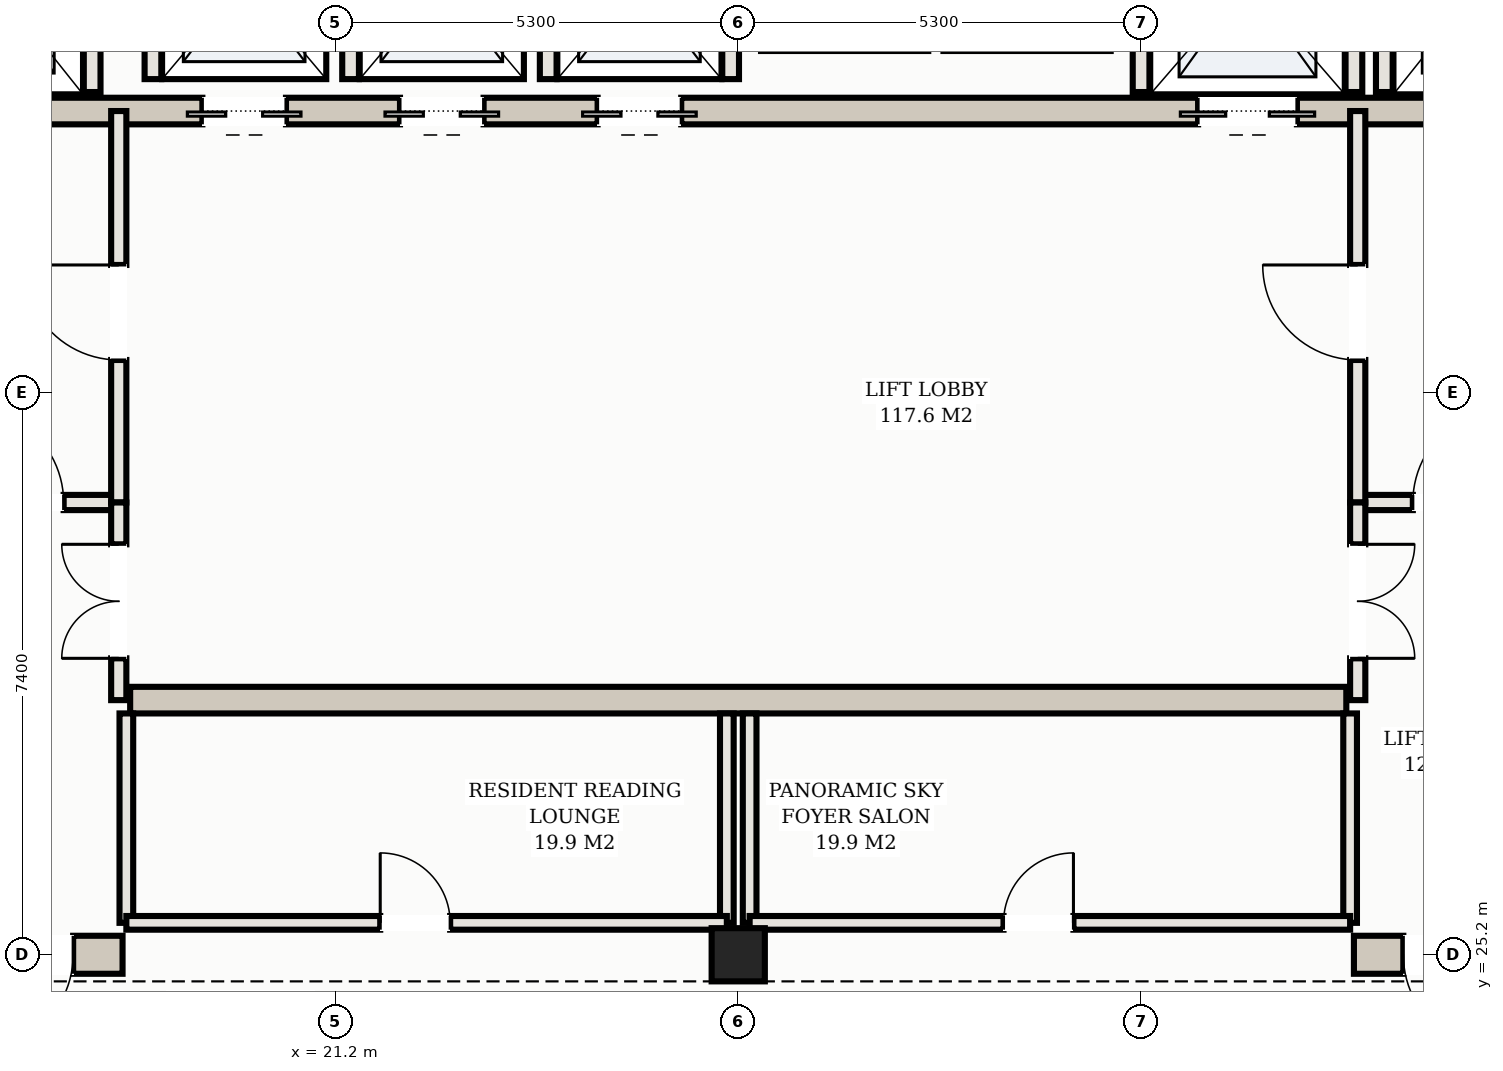
"""IFC4 building model, lengths in metres.
Left out: names, types, materials, properties, quantities, classifications, styles, units other than length and angle.
Written with IfcOpenShell. Run it as: python <this file> out.ifc"""

import sys

from ifc_helpers import new_model, si_unit, direction, frame, frame_2d, origin, origin_2d, place, context, subcontext, project, spatial, rectangle, hollow_rectangle, extrude, element, fill, save


model = new_model("IFC4")
c1 = context("Model", 3, precision=1e-05, world=origin(), true_north=direction((0.0, 1.0)))
c2 = subcontext(c1, "Body", "Model", "MODEL_VIEW")
j1 = project(units=[si_unit("LENGTHUNIT", "METRE"), si_unit("PLANEANGLEUNIT", "RADIAN")], contexts=[c1])
p1 = place(None, origin())
s1 = spatial("IfcSite", under=j1, at=p1, CompositionType="ELEMENT")
p2 = place(p1, origin())
s2 = spatial("IfcBuilding", under=s1, at=p2, CompositionType="ELEMENT")
p3 = place(p2, frame((0.0, 0.0, 256.1)))
s3 = spatial("IfcBuildingStorey", under=s2, at=p3, CompositionType="ELEMENT", Elevation=256.1)
p4 = place(p3, frame((10.35, 25.2, 0.0), z_axis=(0.0, 0.0, 1.0), x_axis=(1.0, 0.0, 0.0)))
e1 = element("IfcWall", 1, at=p4, inside=s3, PredefinedType="SHEAR", context=c2, shape_type="SweptSolid", body=[
    extrude(rectangle(XDim=8.05, YDim=0.5, at=frame_2d((4.025, 0.0))), origin(), (0.0, 0.0, 1.0), 3.11),
])
p5 = place(p4, frame((6.15, 0.0, 0.0)))
e2 = element("IfcOpeningElement", 2, at=p5, cuts=e1, PredefinedType="OPENING", context=c2, shape_type="SweptSolid", body=[
    extrude(rectangle(XDim=1.25, YDim=2.2, at=frame_2d((0.625, 1.1))), frame((0.0, 0.26, 0.0), z_axis=(0.0, -1.0, 0.0), x_axis=(1.0, 0.0, 0.0)), (0.0, 0.0, 1.0), 0.52),
])
p6 = place(p3, frame((34.6, 25.2, 0.0), z_axis=(0.0, 0.0, 1.0), x_axis=(1.0, 0.0, 0.0)))
e3 = element("IfcWall", 3, at=p6, inside=s3, PredefinedType="SHEAR", context=c2, shape_type="SweptSolid", body=[
    extrude(rectangle(XDim=8.05, YDim=0.5, at=frame_2d((4.025, 0.0))), origin(), (0.0, 0.0, 1.0), 3.11),
])
p7 = place(p6, frame((0.65, 0.0, 0.0)))
e4 = element("IfcOpeningElement", 4, at=p7, cuts=e3, PredefinedType="OPENING", context=c2, shape_type="SweptSolid", body=[
    extrude(rectangle(XDim=1.25, YDim=2.2, at=frame_2d((0.625, 1.1))), frame((0.0, 0.26, 0.0), z_axis=(0.0, -1.0, 0.0), x_axis=(1.0, 0.0, 0.0)), (0.0, 0.0, 1.0), 0.52),
])
p8 = place(p3, frame((15.5, 36.3, 0.0), z_axis=(0.0, 0.0, 1.0), x_axis=(1.0, 0.0, 0.0)))
e5 = element("IfcWall", 5, at=p8, inside=s3, PredefinedType="SHEAR", context=c2, shape_type="SweptSolid", body=[
    extrude(rectangle(XDim=22.0, YDim=0.35, at=frame_2d((11.0, 0.0))), origin(), (0.0, 0.0, 1.0), 3.11),
])
p9 = place(p8, frame((0.65, 0.0, 0.0)))
e6 = element("IfcOpeningElement", 6, at=p9, cuts=e5, PredefinedType="OPENING", context=c2, shape_type="SweptSolid", body=[
    extrude(rectangle(XDim=1.1, YDim=2.15, at=frame_2d((0.55, 1.075))), frame((0.0, 0.185, 0.0), z_axis=(0.0, -1.0, 0.0), x_axis=(1.0, 0.0, 0.0)), (0.0, 0.0, 1.0), 0.37),
])
p10 = place(p8, frame((20.25, 0.0, 0.0)))
e7 = element("IfcOpeningElement", 7, at=p10, cuts=e5, PredefinedType="OPENING", context=c2, shape_type="SweptSolid", body=[
    extrude(rectangle(XDim=1.1, YDim=2.15, at=frame_2d((0.55, 1.075))), frame((0.0, 0.185, 0.0), z_axis=(0.0, -1.0, 0.0), x_axis=(1.0, 0.0, 0.0)), (0.0, 0.0, 1.0), 0.37),
])
p11 = place(p8, frame((17.05, 0.0, 0.0)))
e8 = element("IfcOpeningElement", 8, at=p11, cuts=e5, PredefinedType="OPENING", context=c2, shape_type="SweptSolid", body=[
    extrude(rectangle(XDim=1.3, YDim=2.2, at=frame_2d((0.65, 1.1))), frame((0.0, 0.185, 0.0), z_axis=(0.0, -1.0, 0.0), x_axis=(1.0, 0.0, 0.0)), (0.0, 0.0, 1.0), 0.37),
])
p12 = place(p8, frame((3.95, 0.0, 0.0)))
e9 = element("IfcOpeningElement", 9, at=p12, cuts=e5, PredefinedType="OPENING", context=c2, shape_type="SweptSolid", body=[
    extrude(rectangle(XDim=1.1, YDim=2.15, at=frame_2d((0.55, 1.075))), frame((0.0, 0.185, 0.0), z_axis=(0.0, -1.0, 0.0), x_axis=(1.0, 0.0, 0.0)), (0.0, 0.0, 1.0), 0.37),
])
p13 = place(p8, frame((6.55, 0.0, 0.0)))
e10 = element("IfcOpeningElement", 10, at=p13, cuts=e5, PredefinedType="OPENING", context=c2, shape_type="SweptSolid", body=[
    extrude(rectangle(XDim=1.1, YDim=2.15, at=frame_2d((0.55, 1.075))), frame((0.0, 0.185, 0.0), z_axis=(0.0, -1.0, 0.0), x_axis=(1.0, 0.0, 0.0)), (0.0, 0.0, 1.0), 0.37),
])
p14 = place(p8, frame((9.15, 0.0, 0.0)))
e11 = element("IfcOpeningElement", 11, at=p14, cuts=e5, PredefinedType="OPENING", context=c2, shape_type="SweptSolid", body=[
    extrude(rectangle(XDim=1.1, YDim=2.15, at=frame_2d((0.55, 1.075))), frame((0.0, 0.185, 0.0), z_axis=(0.0, -1.0, 0.0), x_axis=(1.0, 0.0, 0.0)), (0.0, 0.0, 1.0), 0.37),
])
p15 = place(p3, frame((18.5, 28.55, 0.0), z_axis=(0.0, 0.0, 1.0), x_axis=(1.0, 0.0, 0.0)))
e12 = element("IfcWall", 12, at=p15, inside=s3, PredefinedType="SHEAR", context=c2, shape_type="SweptSolid", body=[
    extrude(rectangle(XDim=16.0, YDim=0.35, at=frame_2d((8.0, 0.0))), origin(), (0.0, 0.0, 1.0), 3.11),
])
p16 = place(p3, frame((26.5, 25.2, 0.0), z_axis=(0.0, 0.0, 1.0), x_axis=(1.0, 0.0, 0.0)))
e13 = element("IfcColumn", 13, at=p16, inside=s3, PredefinedType="COLUMN", context=c2, shape_type="SweptSolid", body=[
    extrude(hollow_rectangle(XDim=0.7, YDim=0.7, WallThickness=0.025, at=origin_2d()), origin(), (0.0, 0.0, 1.0), 3.3),
])
for number, where, z_axis, x_axis in (
    (14, (18.0, 36.55, 0.0), (0.0, 0.0, 1.0), (0.0, 1.0, 0.0)),
    (15, (35.0, 36.55, 0.0), (0.0, 0.0, 1.0), (0.0, 1.0, 0.0)),
    (16, (31.8, 36.55, 0.0), (0.0, 0.0, 1.0), (0.0, 1.0, 0.0)),
    (17, (34.6, 36.55, 0.0), (0.0, 0.0, 1.0), (0.0, 1.0, 0.0)),
):
    element("IfcWall", number, at=place(p3, frame(where, z_axis=z_axis, x_axis=x_axis)), inside=s3, PredefinedType="SOLIDWALL", context=c2, shape_type="SweptSolid", body=[
        extrude(rectangle(XDim=2.93, YDim=0.22, at=frame_2d((1.465, 0.0))), origin(), (0.0, 0.0, 1.0), 3.11),
    ])
for number, where, z_axis, x_axis in (
    (18, (18.8, 36.72, 0.0), (0.0, 0.0, 1.0), (0.0, 1.0, 0.0)),
    (19, (21.4, 36.72, 0.0), (0.0, 0.0, 1.0), (0.0, 1.0, 0.0)),
    (20, (24.0, 36.72, 0.0), (0.0, 0.0, 1.0), (0.0, 1.0, 0.0)),
    (21, (26.4, 36.72, 0.0), (0.0, 0.0, 1.0), (0.0, 1.0, 0.0)),
):
    element("IfcWall", number, at=place(p3, frame(where, z_axis=z_axis, x_axis=x_axis)), inside=s3, PredefinedType="SOLIDWALL", context=c2, shape_type="SweptSolid", body=[
        extrude(rectangle(XDim=2.56, YDim=0.22, at=frame_2d((1.28, 0.0))), origin(), (0.0, 0.0, 1.0), 3.11),
    ])
p17 = place(p3, frame((15.1, 31.15, 0.0), z_axis=(0.0, 0.0, 1.0), x_axis=(1.0, 0.0, 0.0)))
e22 = element("IfcWall", 22, at=p17, inside=s3, PredefinedType="PARTITIONING", context=c2, shape_type="SweptSolid", body=[
    extrude(rectangle(XDim=3.25, YDim=0.2, at=frame_2d((1.625, 0.0))), origin(), (0.0, 0.0, 1.0), 2.45),
])
p18 = place(p17, frame((1.275, 0.0, 0.0)))
e23 = element("IfcOpeningElement", 23, at=p18, cuts=e22, PredefinedType="OPENING", context=c2, shape_type="SweptSolid", body=[
    extrude(rectangle(XDim=1.25, YDim=2.2, at=frame_2d((0.625, 1.1))), frame((0.0, 0.11, 0.0), z_axis=(0.0, -1.0, 0.0), x_axis=(1.0, 0.0, 0.0)), (0.0, 0.0, 1.0), 0.22),
])
p19 = place(p3, frame((18.35, 31.15, 0.0), z_axis=(0.0, 0.0, 1.0), x_axis=(0.0, 1.0, 0.0)))
e24 = element("IfcWall", 24, at=p19, inside=s3, PredefinedType="PARTITIONING", context=c2, shape_type="SweptSolid", body=[
    extrude(rectangle(XDim=5.15, YDim=0.2, at=frame_2d((2.575, 0.0))), origin(), (0.0, 0.0, 1.0), 2.45),
])
p20 = place(p19, frame((1.875, 0.0, 0.0)))
e25 = element("IfcOpeningElement", 25, at=p20, cuts=e24, PredefinedType="OPENING", context=c2, shape_type="SweptSolid", body=[
    extrude(rectangle(XDim=1.25, YDim=2.2, at=frame_2d((0.625, 1.1))), frame((0.0, 0.11, 0.0), z_axis=(0.0, -1.0, 0.0), x_axis=(1.0, 0.0, 0.0)), (0.0, 0.0, 1.0), 0.22),
])
p21 = place(p3, frame((34.65, 31.15, 0.0), z_axis=(0.0, 0.0, 1.0), x_axis=(1.0, 0.0, 0.0)))
e26 = element("IfcWall", 26, at=p21, inside=s3, PredefinedType="PARTITIONING", context=c2, shape_type="SweptSolid", body=[
    extrude(rectangle(XDim=3.25, YDim=0.2, at=frame_2d((1.625, 0.0))), origin(), (0.0, 0.0, 1.0), 2.45),
])
p22 = place(p21, frame((0.725, 0.0, 0.0)))
e27 = element("IfcOpeningElement", 27, at=p22, cuts=e26, PredefinedType="OPENING", context=c2, shape_type="SweptSolid", body=[
    extrude(rectangle(XDim=1.25, YDim=2.2, at=frame_2d((0.625, 1.1))), frame((0.0, 0.11, 0.0), z_axis=(0.0, -1.0, 0.0), x_axis=(1.0, 0.0, 0.0)), (0.0, 0.0, 1.0), 0.22),
])
p23 = place(p3, frame((34.65, 31.15, 0.0), z_axis=(0.0, 0.0, 1.0), x_axis=(0.0, 1.0, 0.0)))
e28 = element("IfcWall", 28, at=p23, inside=s3, PredefinedType="PARTITIONING", context=c2, shape_type="SweptSolid", body=[
    extrude(rectangle(XDim=5.15, YDim=0.2, at=frame_2d((2.575, 0.0))), origin(), (0.0, 0.0, 1.0), 2.45),
])
p24 = place(p23, frame((1.875, 0.0, 0.0)))
e29 = element("IfcOpeningElement", 29, at=p24, cuts=e28, PredefinedType="OPENING", context=c2, shape_type="SweptSolid", body=[
    extrude(rectangle(XDim=1.25, YDim=2.2, at=frame_2d((0.625, 1.1))), frame((0.0, 0.11, 0.0), z_axis=(0.0, -1.0, 0.0), x_axis=(1.0, 0.0, 0.0)), (0.0, 0.0, 1.0), 0.22),
])
p25 = place(p3, frame((18.35, 28.55, 0.0), z_axis=(0.0, 0.0, 1.0), x_axis=(0.0, 1.0, 0.0)))
e30 = element("IfcWall", 30, at=p25, inside=s3, PredefinedType="PARTITIONING", context=c2, shape_type="SweptSolid", body=[
    extrude(rectangle(XDim=2.6, YDim=0.2, at=frame_2d((1.3, 0.0))), origin(), (0.0, 0.0, 1.0), 2.45),
])
p26 = place(p25, frame((0.55, 0.0, 0.0)))
e31 = element("IfcOpeningElement", 31, at=p26, cuts=e30, PredefinedType="OPENING", context=c2, shape_type="SweptSolid", body=[
    extrude(rectangle(XDim=1.5, YDim=2.25, at=frame_2d((0.75, 1.125))), frame((0.0, 0.11, 0.0), z_axis=(0.0, -1.0, 0.0), x_axis=(1.0, 0.0, 0.0)), (0.0, 0.0, 1.0), 0.22),
])
p27 = place(p3, frame((34.65, 28.55, 0.0), z_axis=(0.0, 0.0, 1.0), x_axis=(0.0, 1.0, 0.0)))
e32 = element("IfcWall", 32, at=p27, inside=s3, PredefinedType="PARTITIONING", context=c2, shape_type="SweptSolid", body=[
    extrude(rectangle(XDim=2.6, YDim=0.2, at=frame_2d((1.3, 0.0))), origin(), (0.0, 0.0, 1.0), 2.45),
])
p28 = place(p27, frame((0.55, 0.0, 0.0)))
e33 = element("IfcOpeningElement", 33, at=p28, cuts=e32, PredefinedType="OPENING", context=c2, shape_type="SweptSolid", body=[
    extrude(rectangle(XDim=1.5, YDim=2.25, at=frame_2d((0.75, 1.125))), frame((0.0, 0.11, 0.0), z_axis=(0.0, -1.0, 0.0), x_axis=(1.0, 0.0, 0.0)), (0.0, 0.0, 1.0), 0.22),
])
for number, where, z_axis, x_axis in (
    (34, (18.45, 25.62, 0.0), (0.0, 0.0, 1.0), (0.0, 1.0, 0.0)),
    (35, (26.35, 25.62, 0.0), (0.0, 0.0, 1.0), (0.0, 1.0, 0.0)),
):
    element("IfcWall", number, at=place(p3, frame(where, z_axis=z_axis, x_axis=x_axis)), inside=s3, PredefinedType="PARTITIONING", context=c2, shape_type="SweptSolid", body=[
        extrude(rectangle(XDim=2.755, YDim=0.18, at=frame_2d((1.377, 0.0))), origin(), (0.0, 0.0, 1.0), 2.45),
    ])
p29 = place(p3, frame((18.45, 25.62, 0.0), z_axis=(0.0, 0.0, 1.0), x_axis=(1.0, 0.0, 0.0)))
e36 = element("IfcWall", 36, at=p29, inside=s3, PredefinedType="PARTITIONING", context=c2, shape_type="SweptSolid", body=[
    extrude(rectangle(XDim=7.9, YDim=0.18, at=frame_2d((3.95, 0.0))), origin(), (0.0, 0.0, 1.0), 2.45),
])
p30 = place(p29, frame((3.34, 0.0, 0.0)))
e37 = element("IfcOpeningElement", 37, at=p30, cuts=e36, PredefinedType="OPENING", context=c2, shape_type="SweptSolid", body=[
    extrude(rectangle(XDim=0.92, YDim=2.15, at=frame_2d((0.46, 1.075))), frame((0.0, 0.1, 0.0), z_axis=(0.0, -1.0, 0.0), x_axis=(1.0, 0.0, 0.0)), (0.0, 0.0, 1.0), 0.2),
])
for number, where, z_axis, x_axis in (
    (38, (26.65, 25.62, 0.0), (0.0, 0.0, 1.0), (0.0, 1.0, 0.0)),
    (39, (34.55, 25.62, 0.0), (0.0, 0.0, 1.0), (0.0, 1.0, 0.0)),
):
    element("IfcWall", number, at=place(p3, frame(where, z_axis=z_axis, x_axis=x_axis)), inside=s3, PredefinedType="PARTITIONING", context=c2, shape_type="SweptSolid", body=[
        extrude(rectangle(XDim=2.755, YDim=0.18, at=frame_2d((1.377, 0.0))), origin(), (0.0, 0.0, 1.0), 2.45),
    ])
p31 = place(p3, frame((26.65, 25.62, 0.0), z_axis=(0.0, 0.0, 1.0), x_axis=(1.0, 0.0, 0.0)))
e40 = element("IfcWall", 40, at=p31, inside=s3, PredefinedType="PARTITIONING", context=c2, shape_type="SweptSolid", body=[
    extrude(rectangle(XDim=7.9, YDim=0.18, at=frame_2d((3.95, 0.0))), origin(), (0.0, 0.0, 1.0), 2.45),
])
p32 = place(p31, frame((3.34, 0.0, 0.0)))
e41 = element("IfcOpeningElement", 41, at=p32, cuts=e40, PredefinedType="OPENING", context=c2, shape_type="SweptSolid", body=[
    extrude(rectangle(XDim=0.92, YDim=2.15, at=frame_2d((0.46, 1.075))), frame((0.0, 0.1, 0.0), z_axis=(0.0, -1.0, 0.0), x_axis=(1.0, 0.0, 0.0)), (0.0, 0.0, 1.0), 0.2),
])
p33 = place(p11, frame((1.3, 0.0, 0.0), z_axis=(0.0, 0.0, 1.0), x_axis=(-1.0, 0.0, 0.0)))
e42 = element("IfcDoor", 42, at=p33, inside=s3, OperationType="DOUBLE_DOOR_SLIDING", PredefinedType="DOOR", context=c2, shape_type="SweptSolid", body=[
    extrude(rectangle(XDim=1.3, YDim=2.2, at=frame_2d((0.65, 1.1))), frame((0.0, 0.025, 0.0), z_axis=(0.0, -1.0, 0.0), x_axis=(1.0, 0.0, 0.0)), (0.0, 0.0, 1.0), 0.05),
])
fill(e8, e42)
p34 = place(p12, frame((1.1, 0.0, 0.0), z_axis=(0.0, 0.0, 1.0), x_axis=(-1.0, 0.0, 0.0)))
e43 = element("IfcDoor", 43, at=p34, inside=s3, OperationType="DOUBLE_DOOR_SLIDING", PredefinedType="DOOR", context=c2, shape_type="SweptSolid", body=[
    extrude(rectangle(XDim=1.1, YDim=2.15, at=frame_2d((0.55, 1.075))), frame((0.0, 0.025, 0.0), z_axis=(0.0, -1.0, 0.0), x_axis=(1.0, 0.0, 0.0)), (0.0, 0.0, 1.0), 0.05),
])
fill(e9, e43)
p35 = place(p13, frame((1.1, 0.0, 0.0), z_axis=(0.0, 0.0, 1.0), x_axis=(-1.0, 0.0, 0.0)))
e44 = element("IfcDoor", 44, at=p35, inside=s3, OperationType="DOUBLE_DOOR_SLIDING", PredefinedType="DOOR", context=c2, shape_type="SweptSolid", body=[
    extrude(rectangle(XDim=1.1, YDim=2.15, at=frame_2d((0.55, 1.075))), frame((0.0, 0.025, 0.0), z_axis=(0.0, -1.0, 0.0), x_axis=(1.0, 0.0, 0.0)), (0.0, 0.0, 1.0), 0.05),
])
fill(e10, e44)
p36 = place(p14, frame((1.1, 0.0, 0.0), z_axis=(0.0, 0.0, 1.0), x_axis=(-1.0, 0.0, 0.0)))
e45 = element("IfcDoor", 45, at=p36, inside=s3, OperationType="DOUBLE_DOOR_SLIDING", PredefinedType="DOOR", context=c2, shape_type="SweptSolid", body=[
    extrude(rectangle(XDim=1.1, YDim=2.15, at=frame_2d((0.55, 1.075))), frame((0.0, 0.025, 0.0), z_axis=(0.0, -1.0, 0.0), x_axis=(1.0, 0.0, 0.0)), (0.0, 0.0, 1.0), 0.05),
])
fill(e11, e45)
p37 = place(p5, frame((1.25, 0.0, 0.0), z_axis=(0.0, 0.0, 1.0), x_axis=(-1.0, 0.0, 0.0)))
e46 = element("IfcDoor", 46, at=p37, inside=s3, OperationType="SINGLE_SWING_RIGHT", PredefinedType="DOOR", context=c2, shape_type="SweptSolid", body=[
    extrude(rectangle(XDim=1.25, YDim=2.2, at=frame_2d((0.625, 1.1))), frame((0.0, 0.025, 0.0), z_axis=(0.0, -1.0, 0.0), x_axis=(1.0, 0.0, 0.0)), (0.0, 0.0, 1.0), 0.05),
])
fill(e2, e46)
p38 = place(p7, frame((1.25, 0.0, 0.0), z_axis=(0.0, 0.0, 1.0), x_axis=(-1.0, 0.0, 0.0)))
e47 = element("IfcDoor", 47, at=p38, inside=s3, OperationType="SINGLE_SWING_LEFT", PredefinedType="DOOR", context=c2, shape_type="SweptSolid", body=[
    extrude(rectangle(XDim=1.25, YDim=2.2, at=frame_2d((0.625, 1.1))), frame((0.0, 0.025, 0.0), z_axis=(0.0, -1.0, 0.0), x_axis=(1.0, 0.0, 0.0)), (0.0, 0.0, 1.0), 0.05),
])
fill(e4, e47)
p39 = place(p18, origin())
e48 = element("IfcDoor", 48, at=p39, inside=s3, OperationType="SINGLE_SWING_LEFT", PredefinedType="DOOR", context=c2, shape_type="SweptSolid", body=[
    extrude(rectangle(XDim=1.25, YDim=2.2, at=frame_2d((0.625, 1.1))), frame((0.0, 0.025, 0.0), z_axis=(0.0, -1.0, 0.0), x_axis=(1.0, 0.0, 0.0)), (0.0, 0.0, 1.0), 0.05),
])
fill(e23, e48)
p40 = place(p20, origin())
e49 = element("IfcDoor", 49, at=p40, inside=s3, OperationType="SINGLE_SWING_RIGHT", PredefinedType="DOOR", context=c2, shape_type="SweptSolid", body=[
    extrude(rectangle(XDim=1.25, YDim=2.2, at=frame_2d((0.625, 1.1))), frame((0.0, 0.025, 0.0), z_axis=(0.0, -1.0, 0.0), x_axis=(1.0, 0.0, 0.0)), (0.0, 0.0, 1.0), 0.05),
])
fill(e25, e49)
p41 = place(p22, origin())
e50 = element("IfcDoor", 50, at=p41, inside=s3, OperationType="SINGLE_SWING_RIGHT", PredefinedType="DOOR", context=c2, shape_type="SweptSolid", body=[
    extrude(rectangle(XDim=1.25, YDim=2.2, at=frame_2d((0.625, 1.1))), frame((0.0, 0.025, 0.0), z_axis=(0.0, -1.0, 0.0), x_axis=(1.0, 0.0, 0.0)), (0.0, 0.0, 1.0), 0.05),
])
fill(e27, e50)
p42 = place(p24, origin())
e51 = element("IfcDoor", 51, at=p42, inside=s3, OperationType="SINGLE_SWING_RIGHT", PredefinedType="DOOR", context=c2, shape_type="SweptSolid", body=[
    extrude(rectangle(XDim=1.25, YDim=2.2, at=frame_2d((0.625, 1.1))), frame((0.0, 0.025, 0.0), z_axis=(0.0, -1.0, 0.0), x_axis=(1.0, 0.0, 0.0)), (0.0, 0.0, 1.0), 0.05),
])
fill(e29, e51)
p43 = place(p26, origin())
e52 = element("IfcDoor", 52, at=p43, inside=s3, OperationType="DOUBLE_DOOR_SINGLE_SWING", PredefinedType="DOOR", context=c2, shape_type="SweptSolid", body=[
    extrude(rectangle(XDim=1.5, YDim=2.25, at=frame_2d((0.75, 1.125))), frame((0.0, 0.025, 0.0), z_axis=(0.0, -1.0, 0.0), x_axis=(1.0, 0.0, 0.0)), (0.0, 0.0, 1.0), 0.05),
])
fill(e31, e52)
p44 = place(p28, frame((1.5, 0.0, 0.0), z_axis=(0.0, 0.0, 1.0), x_axis=(-1.0, 0.0, 0.0)))
e53 = element("IfcDoor", 53, at=p44, inside=s3, OperationType="DOUBLE_DOOR_SINGLE_SWING", PredefinedType="DOOR", context=c2, shape_type="SweptSolid", body=[
    extrude(rectangle(XDim=1.5, YDim=2.25, at=frame_2d((0.75, 1.125))), frame((0.0, 0.025, 0.0), z_axis=(0.0, -1.0, 0.0), x_axis=(1.0, 0.0, 0.0)), (0.0, 0.0, 1.0), 0.05),
])
fill(e33, e53)
p45 = place(p30, origin())
e54 = element("IfcDoor", 54, at=p45, inside=s3, OperationType="SINGLE_SWING_LEFT", PredefinedType="DOOR", context=c2, shape_type="SweptSolid", body=[
    extrude(rectangle(XDim=0.92, YDim=2.15, at=frame_2d((0.46, 1.075))), frame((0.0, 0.025, 0.0), z_axis=(0.0, -1.0, 0.0), x_axis=(1.0, 0.0, 0.0)), (0.0, 0.0, 1.0), 0.05),
])
fill(e37, e54)
p46 = place(p32, origin())
e55 = element("IfcDoor", 55, at=p46, inside=s3, OperationType="SINGLE_SWING_RIGHT", PredefinedType="DOOR", context=c2, shape_type="SweptSolid", body=[
    extrude(rectangle(XDim=0.92, YDim=2.15, at=frame_2d((0.46, 1.075))), frame((0.0, 0.025, 0.0), z_axis=(0.0, -1.0, 0.0), x_axis=(1.0, 0.0, 0.0)), (0.0, 0.0, 1.0), 0.05),
])
fill(e41, e55)
save(model, sys.argv[1])
